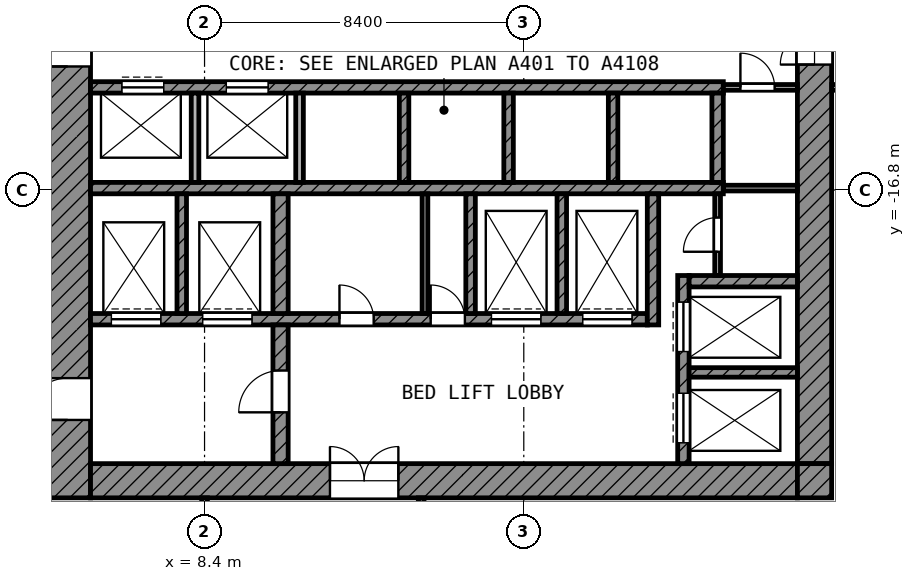
"""IFC4 building model, lengths in metres.
Left out: names, types, materials, properties, quantities, classifications, styles, units other than length and angle.
Written with IfcOpenShell. Run it as: python <this file> out.ifc"""

import sys

from ifc_helpers import new_model, si_unit, direction, frame, frame_2d, origin, place, context, subcontext, project, spatial, rectangle, extrude, element, fill, save


model = new_model("IFC4")
c1 = context("Model", 3, precision=1e-05, world=origin(), true_north=direction((0.0, 1.0)))
c2 = subcontext(c1, "Body", "Model", "MODEL_VIEW")
j1 = project(units=[si_unit("LENGTHUNIT", "METRE"), si_unit("PLANEANGLEUNIT", "RADIAN")], contexts=[c1])
p1 = place(None, origin())
s1 = spatial("IfcSite", under=j1, at=p1, CompositionType="ELEMENT")
p2 = place(p1, origin())
s2 = spatial("IfcBuilding", under=s1, at=p2, CompositionType="ELEMENT")
p3 = place(p2, frame((0.0, 0.0, 200.4)))
s3 = spatial("IfcBuildingStorey", under=s2, at=p3, CompositionType="ELEMENT", Elevation=200.4)
p4 = place(p3, frame((4.8, -24.9, 0.0), z_axis=(0.0, 0.0, 1.0), x_axis=(0.0, 1.0, 0.0)))
e1 = element("IfcWall", 1, at=p4, inside=s3, PredefinedType="SHEAR", context=c2, shape_type="SweptSolid", body=[
    extrude(rectangle(XDim=19.5, YDim=1.2, at=frame_2d((9.75, 0.0))), origin(), (0.0, 0.0, 1.0), 3.6),
])
p5 = place(p4, frame((11.35, 0.0, 0.0)))
e2 = element("IfcOpeningElement", 2, at=p5, cuts=e1, PredefinedType="OPENING", context=c2, shape_type="SweptSolid", body=[
    extrude(rectangle(XDim=1.1, YDim=2.1, at=frame_2d((0.55, 1.05))), frame((0.0, 0.61, 0.0), z_axis=(0.0, -1.0, 0.0), x_axis=(1.0, 0.0, 0.0)), (0.0, 0.0, 1.0), 1.22),
])
p6 = place(p4, frame((2.05, 0.0, 0.0)))
e3 = element("IfcOpeningElement", 3, at=p6, cuts=e1, PredefinedType="OPENING", context=c2, shape_type="SweptSolid", body=[
    extrude(rectangle(XDim=1.1, YDim=2.1, at=frame_2d((0.55, 1.05))), frame((0.0, 0.61, 0.0), z_axis=(0.0, -1.0, 0.0), x_axis=(1.0, 0.0, 0.0)), (0.0, 0.0, 1.0), 1.22),
])
p7 = place(p3, frame((24.45, -24.0, 0.0), z_axis=(0.0, 0.0, 1.0), x_axis=(0.0, 1.0, 0.0)))
e4 = element("IfcWall", 4, at=p7, inside=s3, PredefinedType="SHEAR", context=c2, shape_type="SweptSolid", body=[
    extrude(rectangle(XDim=18.6, YDim=0.9, at=frame_2d((9.3, 0.0))), origin(), (0.0, 0.0, 1.0), 3.6),
])
p8 = place(p7, frame((10.5, 0.0, 0.0)))
e5 = element("IfcOpeningElement", 5, at=p8, cuts=e4, PredefinedType="OPENING", context=c2, shape_type="SweptSolid", body=[
    extrude(rectangle(XDim=1.8, YDim=2.1, at=frame_2d((0.9, 1.05))), frame((0.0, 0.46, 0.0), z_axis=(0.0, -1.0, 0.0), x_axis=(1.0, 0.0, 0.0)), (0.0, 0.0, 1.0), 0.92),
])
p9 = place(p3, frame((5.4, -24.45, 0.0), z_axis=(0.0, 0.0, 1.0), x_axis=(1.0, 0.0, 0.0)))
e6 = element("IfcWall", 6, at=p9, inside=s3, PredefinedType="SHEAR", context=c2, shape_type="SweptSolid", body=[
    extrude(rectangle(XDim=18.6, YDim=0.9, at=frame_2d((9.3, 0.0))), origin(), (0.0, 0.0, 1.0), 3.6),
])
p10 = place(p9, frame((6.3, 0.0, 0.0)))
e7 = element("IfcOpeningElement", 7, at=p10, cuts=e6, PredefinedType="OPENING", context=c2, shape_type="SweptSolid", body=[
    extrude(rectangle(XDim=1.8, YDim=2.1, at=frame_2d((0.9, 1.05))), frame((0.0, 0.46, 0.0), z_axis=(0.0, -1.0, 0.0), x_axis=(1.0, 0.0, 0.0)), (0.0, 0.0, 1.0), 0.92),
])
p11 = place(p3, frame((24.45, -24.9, 0.0), z_axis=(0.0, 0.0, 1.0), x_axis=(0.0, 1.0, 0.0)))
e8 = element("IfcWall", 8, at=p11, inside=s3, PredefinedType="SHEAR", context=c2, shape_type="SweptSolid", body=[
    extrude(rectangle(XDim=0.9, YDim=0.9, at=frame_2d((0.45, 0.0))), origin(), (0.0, 0.0, 1.0), 3.6),
])
p12 = place(p3, frame((5.4, -14.1, 0.0), z_axis=(0.0, 0.0, 1.0), x_axis=(1.0, 0.0, 0.0)))
e9 = element("IfcWall", 9, at=p12, inside=s3, PredefinedType="SHEAR", context=c2, shape_type="SweptSolid", body=[
    extrude(rectangle(XDim=16.65, YDim=0.3, at=frame_2d((8.325, 0.0))), origin(), (0.0, 0.0, 1.0), 3.6),
])
p13 = place(p12, frame((0.825, 0.0, 0.0)))
e10 = element("IfcOpeningElement", 10, at=p13, cuts=e9, PredefinedType="OPENING", context=c2, shape_type="SweptSolid", body=[
    extrude(rectangle(XDim=1.1, YDim=2.1, at=frame_2d((0.55, 1.05))), frame((0.0, 0.16, 0.0), z_axis=(0.0, -1.0, 0.0), x_axis=(1.0, 0.0, 0.0)), (0.0, 0.0, 1.0), 0.32),
])
p14 = place(p12, frame((3.575, 0.0, 0.0)))
e11 = element("IfcOpeningElement", 11, at=p14, cuts=e9, PredefinedType="OPENING", context=c2, shape_type="SweptSolid", body=[
    extrude(rectangle(XDim=1.1, YDim=2.1, at=frame_2d((0.55, 1.05))), frame((0.0, 0.16, 0.0), z_axis=(0.0, -1.0, 0.0), x_axis=(1.0, 0.0, 0.0)), (0.0, 0.0, 1.0), 0.32),
])
p15 = place(p3, frame((5.4, -16.75, 0.0), z_axis=(0.0, 0.0, 1.0), x_axis=(1.0, 0.0, 0.0)))
e12 = element("IfcWall", 12, at=p15, inside=s3, PredefinedType="SHEAR", context=c2, shape_type="SweptSolid", body=[
    extrude(rectangle(XDim=16.65, YDim=0.3, at=frame_2d((8.325, 0.0))), origin(), (0.0, 0.0, 1.0), 3.6),
])
p16 = place(p3, frame((5.4, -20.2, 0.0), z_axis=(0.0, 0.0, 1.0), x_axis=(1.0, 0.0, 0.0)))
e13 = element("IfcWall", 13, at=p16, inside=s3, PredefinedType="SHEAR", context=c2, shape_type="SweptSolid", body=[
    extrude(rectangle(XDim=14.65, YDim=0.3, at=frame_2d((7.325, 0.0))), origin(), (0.0, 0.0, 1.0), 3.6),
])
p17 = place(p16, frame((10.55, 0.0, 0.0)))
e14 = element("IfcOpeningElement", 14, at=p17, cuts=e13, PredefinedType="OPENING", context=c2, shape_type="SweptSolid", body=[
    extrude(rectangle(XDim=1.3, YDim=2.1, at=frame_2d((0.65, 1.05))), frame((0.0, 0.16, 0.0), z_axis=(0.0, -1.0, 0.0), x_axis=(1.0, 0.0, 0.0)), (0.0, 0.0, 1.0), 0.32),
])
p18 = place(p16, frame((12.95, 0.0, 0.0)))
e15 = element("IfcOpeningElement", 15, at=p18, cuts=e13, PredefinedType="OPENING", context=c2, shape_type="SweptSolid", body=[
    extrude(rectangle(XDim=1.3, YDim=2.1, at=frame_2d((0.65, 1.05))), frame((0.0, 0.16, 0.0), z_axis=(0.0, -1.0, 0.0), x_axis=(1.0, 0.0, 0.0)), (0.0, 0.0, 1.0), 0.32),
])
p19 = place(p16, frame((0.55, 0.0, 0.0)))
e16 = element("IfcOpeningElement", 16, at=p19, cuts=e13, PredefinedType="OPENING", context=c2, shape_type="SweptSolid", body=[
    extrude(rectangle(XDim=1.3, YDim=2.1, at=frame_2d((0.65, 1.05))), frame((0.0, 0.16, 0.0), z_axis=(0.0, -1.0, 0.0), x_axis=(1.0, 0.0, 0.0)), (0.0, 0.0, 1.0), 0.32),
])
p20 = place(p16, frame((2.95, 0.0, 0.0)))
e17 = element("IfcOpeningElement", 17, at=p20, cuts=e13, PredefinedType="OPENING", context=c2, shape_type="SweptSolid", body=[
    extrude(rectangle(XDim=1.3, YDim=2.1, at=frame_2d((0.65, 1.05))), frame((0.0, 0.16, 0.0), z_axis=(0.0, -1.0, 0.0), x_axis=(1.0, 0.0, 0.0)), (0.0, 0.0, 1.0), 0.32),
])
p21 = place(p16, frame((6.55, 0.0, 0.0)))
e18 = element("IfcOpeningElement", 18, at=p21, cuts=e13, PredefinedType="OPENING", context=c2, shape_type="SweptSolid", body=[
    extrude(rectangle(XDim=0.9, YDim=2.1, at=frame_2d((0.45, 1.05))), frame((0.0, 0.16, 0.0), z_axis=(0.0, -1.0, 0.0), x_axis=(1.0, 0.0, 0.0)), (0.0, 0.0, 1.0), 0.32),
])
p22 = place(p16, frame((8.95, 0.0, 0.0)))
e19 = element("IfcOpeningElement", 19, at=p22, cuts=e13, PredefinedType="OPENING", context=c2, shape_type="SweptSolid", body=[
    extrude(rectangle(XDim=0.9, YDim=2.1, at=frame_2d((0.45, 1.05))), frame((0.0, 0.16, 0.0), z_axis=(0.0, -1.0, 0.0), x_axis=(1.0, 0.0, 0.0)), (0.0, 0.0, 1.0), 0.32),
])
p23 = place(p3, frame((10.4, -24.0, 0.0), z_axis=(0.0, 0.0, 1.0), x_axis=(0.0, 1.0, 0.0)))
e20 = element("IfcWall", 20, at=p23, inside=s3, PredefinedType="SHEAR", context=c2, shape_type="SweptSolid", body=[
    extrude(rectangle(XDim=3.65, YDim=0.4, at=frame_2d((1.825, 0.0))), origin(), (0.0, 0.0, 1.0), 3.6),
])
p24 = place(p23, frame((1.35, 0.0, 0.0)))
e21 = element("IfcOpeningElement", 21, at=p24, cuts=e20, PredefinedType="OPENING", context=c2, shape_type="SweptSolid", body=[
    extrude(rectangle(XDim=1.1, YDim=2.1, at=frame_2d((0.55, 1.05))), frame((0.0, 0.21, 0.0), z_axis=(0.0, -1.0, 0.0), x_axis=(1.0, 0.0, 0.0)), (0.0, 0.0, 1.0), 0.42),
])
p25 = place(p3, frame((10.4, -20.05, 0.0), z_axis=(0.0, 0.0, 1.0), x_axis=(0.0, 1.0, 0.0)))
e22 = element("IfcWall", 22, at=p25, inside=s3, PredefinedType="SHEAR", context=c2, shape_type="SweptSolid", body=[
    extrude(rectangle(XDim=3.15, YDim=0.4, at=frame_2d((1.575, 0.0))), origin(), (0.0, 0.0, 1.0), 3.6),
])
p26 = place(p3, frame((20.2, -20.35, 0.0), z_axis=(0.0, 0.0, 1.0), x_axis=(0.0, 1.0, 0.0)))
e23 = element("IfcWall", 23, at=p26, inside=s3, PredefinedType="SHEAR", context=c2, shape_type="SweptSolid", body=[
    extrude(rectangle(XDim=3.45, YDim=0.3, at=frame_2d((1.725, 0.0))), origin(), (0.0, 0.0, 1.0), 3.6),
])
p27 = place(p3, frame((21.9, -16.6, 0.0), z_axis=(0.0, 0.0, 1.0), x_axis=(0.0, 1.0, 0.0)))
e24 = element("IfcWall", 24, at=p27, inside=s3, PredefinedType="SHEAR", context=c2, shape_type="SweptSolid", body=[
    extrude(rectangle(XDim=2.35, YDim=0.3, at=frame_2d((1.175, 0.0))), origin(), (0.0, 0.0, 1.0), 3.6),
])
p28 = place(p3, frame((21.15, -19.2, 0.0), z_axis=(0.0, 0.0, 1.0), x_axis=(1.0, 0.0, 0.0)))
e25 = element("IfcWall", 25, at=p28, inside=s3, PredefinedType="SHEAR", context=c2, shape_type="SweptSolid", body=[
    extrude(rectangle(XDim=2.85, YDim=0.3, at=frame_2d((1.425, 0.0))), origin(), (0.0, 0.0, 1.0), 3.6),
])
p29 = place(p3, frame((21.0, -24.0, 0.0), z_axis=(0.0, 0.0, 1.0), x_axis=(0.0, 1.0, 0.0)))
e26 = element("IfcWall", 26, at=p29, inside=s3, PredefinedType="SHEAR", context=c2, shape_type="SweptSolid", body=[
    extrude(rectangle(XDim=4.95, YDim=0.3, at=frame_2d((2.475, 0.0))), origin(), (0.0, 0.0, 1.0), 3.6),
])
p30 = place(p29, frame((2.95, 0.0, 0.0)))
e27 = element("IfcOpeningElement", 27, at=p30, cuts=e26, PredefinedType="OPENING", context=c2, shape_type="SweptSolid", body=[
    extrude(rectangle(XDim=1.3, YDim=2.1, at=frame_2d((0.65, 1.05))), frame((0.0, 0.16, 0.0), z_axis=(0.0, -1.0, 0.0), x_axis=(1.0, 0.0, 0.0)), (0.0, 0.0, 1.0), 0.32),
])
p31 = place(p29, frame((0.55, 0.0, 0.0)))
e28 = element("IfcOpeningElement", 28, at=p31, cuts=e26, PredefinedType="OPENING", context=c2, shape_type="SweptSolid", body=[
    extrude(rectangle(XDim=1.3, YDim=2.1, at=frame_2d((0.65, 1.05))), frame((0.0, 0.16, 0.0), z_axis=(0.0, -1.0, 0.0), x_axis=(1.0, 0.0, 0.0)), (0.0, 0.0, 1.0), 0.32),
])
p32 = place(p3, frame((21.15, -21.6, 0.0), z_axis=(0.0, 0.0, 1.0), x_axis=(1.0, 0.0, 0.0)))
e29 = element("IfcWall", 29, at=p32, inside=s3, PredefinedType="SHEAR", context=c2, shape_type="SweptSolid", body=[
    extrude(rectangle(XDim=2.85, YDim=0.25, at=frame_2d((1.425, 0.0))), origin(), (0.0, 0.0, 1.0), 3.6),
])
for number, where, z_axis, x_axis in (
    (30, (7.8, -20.05, 0.0), (0.0, 0.0, 1.0), (0.0, 1.0, 0.0)),
    (31, (15.4, -20.05, 0.0), (0.0, 0.0, 1.0), (0.0, 1.0, 0.0)),
    (32, (17.8, -20.05, 0.0), (0.0, 0.0, 1.0), (0.0, 1.0, 0.0)),
):
    element("IfcWall", number, at=place(p3, frame(where, z_axis=z_axis, x_axis=x_axis)), inside=s3, PredefinedType="SHEAR", context=c2, shape_type="SweptSolid", body=[
        extrude(rectangle(XDim=3.15, YDim=0.25, at=frame_2d((1.575, 0.0))), origin(), (0.0, 0.0, 1.0), 3.6),
    ])
for number, where, z_axis, x_axis in (
    (33, (8.15, -16.6, 0.0), (0.0, 0.0, 1.0), (0.0, 1.0, 0.0)),
    (34, (10.9, -16.6, 0.0), (0.0, 0.0, 1.0), (0.0, 1.0, 0.0)),
):
    element("IfcWall", number, at=place(p3, frame(where, z_axis=z_axis, x_axis=x_axis)), inside=s3, PredefinedType="PARTITIONING", context=c2, shape_type="SweptSolid", body=[
        extrude(rectangle(XDim=2.35, YDim=0.2, at=frame_2d((1.175, 0.0))), origin(), (0.0, 0.0, 1.0), 3.6),
    ])
for number, where, z_axis, x_axis in (
    (35, (13.65, -16.6, 0.0), (0.0, 0.0, 1.0), (0.0, 1.0, 0.0)),
    (36, (16.4, -16.6, 0.0), (0.0, 0.0, 1.0), (0.0, 1.0, 0.0)),
    (37, (19.15, -16.6, 0.0), (0.0, 0.0, 1.0), (0.0, 1.0, 0.0)),
):
    element("IfcWall", number, at=place(p3, frame(where, z_axis=z_axis, x_axis=x_axis)), inside=s3, PredefinedType="SHEAR", context=c2, shape_type="SweptSolid", body=[
        extrude(rectangle(XDim=2.35, YDim=0.25, at=frame_2d((1.175, 0.0))), origin(), (0.0, 0.0, 1.0), 3.6),
    ])
p33 = place(p3, frame((21.9, -19.05, 0.0), z_axis=(0.0, 0.0, 1.0), x_axis=(0.0, 1.0, 0.0)))
e38 = element("IfcWall", 38, at=p33, inside=s3, PredefinedType="PARTITIONING", context=c2, shape_type="SweptSolid", body=[
    extrude(rectangle(XDim=2.15, YDim=0.15, at=frame_2d((1.075, 0.0))), origin(), (0.0, 0.0, 1.0), 3.6),
])
p34 = place(p33, frame((0.625, 0.0, 0.0)))
e39 = element("IfcOpeningElement", 39, at=p34, cuts=e38, PredefinedType="OPENING", context=c2, shape_type="SweptSolid", body=[
    extrude(rectangle(XDim=0.9, YDim=2.1, at=frame_2d((0.45, 1.05))), frame((0.0, 0.085, 0.0), z_axis=(0.0, -1.0, 0.0), x_axis=(1.0, 0.0, 0.0)), (0.0, 0.0, 1.0), 0.17),
])
p35 = place(p3, frame((22.05, -16.75, 0.0), z_axis=(0.0, 0.0, 1.0), x_axis=(1.0, 0.0, 0.0)))
e40 = element("IfcWall", 40, at=p35, inside=s3, PredefinedType="PARTITIONING", context=c2, shape_type="SweptSolid", body=[
    extrude(rectangle(XDim=1.95, YDim=0.15, at=frame_2d((0.975, 0.0))), origin(), (0.0, 0.0, 1.0), 3.6),
])
p36 = place(p3, frame((22.05, -14.1, 0.0), z_axis=(0.0, 0.0, 1.0), x_axis=(1.0, 0.0, 0.0)))
e41 = element("IfcWall", 41, at=p36, inside=s3, PredefinedType="PARTITIONING", context=c2, shape_type="SweptSolid", body=[
    extrude(rectangle(XDim=1.95, YDim=0.15, at=frame_2d((0.975, 0.0))), origin(), (0.0, 0.0, 1.0), 3.6),
])
p37 = place(p36, frame((0.45, 0.0, 0.0)))
e42 = element("IfcOpeningElement", 42, at=p37, cuts=e41, PredefinedType="OPENING", context=c2, shape_type="SweptSolid", body=[
    extrude(rectangle(XDim=0.9, YDim=2.1, at=frame_2d((0.45, 1.05))), frame((0.0, 0.085, 0.0), z_axis=(0.0, -1.0, 0.0), x_axis=(1.0, 0.0, 0.0)), (0.0, 0.0, 1.0), 0.17),
])
p38 = place(p3, frame((14.2, -20.05, 0.0), z_axis=(0.0, 0.0, 1.0), x_axis=(0.0, 1.0, 0.0)))
e43 = element("IfcWall", 43, at=p38, inside=s3, PredefinedType="PARTITIONING", context=c2, shape_type="SweptSolid", body=[
    extrude(rectangle(XDim=3.15, YDim=0.15, at=frame_2d((1.575, 0.0))), origin(), (0.0, 0.0, 1.0), 3.6),
])
p39 = place(p3, frame((24.9, -14.1, 0.0), z_axis=(0.0, 0.0, 1.0), x_axis=(1.0, 0.0, 0.0)))
e44 = element("IfcWall", 44, at=p39, inside=s3, PredefinedType="PARTITIONING", context=c2, shape_type="SweptSolid", body=[
    extrude(rectangle(XDim=4.425, YDim=0.15, at=frame_2d((2.212, 0.0))), origin(), (0.0, 0.0, 1.0), 3.6),
])
p40 = place(p39, frame((1.65, 0.0, 0.0)))
e45 = element("IfcOpeningElement", 45, at=p40, cuts=e44, PredefinedType="OPENING", context=c2, shape_type="SweptSolid", body=[
    extrude(rectangle(XDim=1.5, YDim=2.1, at=frame_2d((0.75, 1.05))), frame((0.0, 0.085, 0.0), z_axis=(0.0, -1.0, 0.0), x_axis=(1.0, 0.0, 0.0)), (0.0, 0.0, 1.0), 0.17),
])
p41 = place(p3, frame((8.4, -31.857, 0.0), z_axis=(0.0, 0.0, 1.0), x_axis=(0.0, 1.0, 0.0)))
e46 = element("IfcWall", 46, at=p41, inside=s3, PredefinedType="PARTITIONING", context=c2, shape_type="SweptSolid", body=[
    extrude(rectangle(XDim=6.957, YDim=0.15, at=frame_2d((3.479, 0.0))), origin(), (0.0, 0.0, 1.0), 3.6),
])
p42 = place(p3, frame((14.1, -29.325, 0.0), z_axis=(0.0, 0.0, 1.0), x_axis=(0.0, 1.0, 0.0)))
e47 = element("IfcWall", 47, at=p42, inside=s3, PredefinedType="PARTITIONING", context=c2, shape_type="SweptSolid", body=[
    extrude(rectangle(XDim=4.425, YDim=0.15, at=frame_2d((2.212, 0.0))), origin(), (0.0, 0.0, 1.0), 3.6),
])
p43 = place(p13, origin())
e48 = element("IfcDoor", 48, at=p43, inside=s3, OperationType="DOUBLE_DOOR_SLIDING", PredefinedType="DOOR", context=c2, shape_type="SweptSolid", body=[
    extrude(rectangle(XDim=1.1, YDim=2.1, at=frame_2d((0.55, 1.05))), frame((0.0, 0.025, 0.0), z_axis=(0.0, -1.0, 0.0), x_axis=(1.0, 0.0, 0.0)), (0.0, 0.0, 1.0), 0.05),
])
fill(e10, e48)
p44 = place(p14, origin())
e49 = element("IfcDoor", 49, at=p44, inside=s3, OperationType="DOUBLE_DOOR_SLIDING", PredefinedType="DOOR", context=c2, shape_type="SweptSolid", body=[
    extrude(rectangle(XDim=1.1, YDim=2.1, at=frame_2d((0.55, 1.05))), frame((0.0, 0.025, 0.0), z_axis=(0.0, -1.0, 0.0), x_axis=(1.0, 0.0, 0.0)), (0.0, 0.0, 1.0), 0.05),
])
fill(e11, e49)
p45 = place(p30, origin())
e50 = element("IfcDoor", 50, at=p45, inside=s3, OperationType="DOUBLE_DOOR_SLIDING", PredefinedType="DOOR", context=c2, shape_type="SweptSolid", body=[
    extrude(rectangle(XDim=1.3, YDim=2.1, at=frame_2d((0.65, 1.05))), frame((0.0, 0.025, 0.0), z_axis=(0.0, -1.0, 0.0), x_axis=(1.0, 0.0, 0.0)), (0.0, 0.0, 1.0), 0.05),
])
fill(e27, e50)
p46 = place(p31, origin())
e51 = element("IfcDoor", 51, at=p46, inside=s3, OperationType="DOUBLE_DOOR_SLIDING", PredefinedType="DOOR", context=c2, shape_type="SweptSolid", body=[
    extrude(rectangle(XDim=1.3, YDim=2.1, at=frame_2d((0.65, 1.05))), frame((0.0, 0.025, 0.0), z_axis=(0.0, -1.0, 0.0), x_axis=(1.0, 0.0, 0.0)), (0.0, 0.0, 1.0), 0.05),
])
fill(e28, e51)
p47 = place(p17, origin())
e52 = element("IfcDoor", 52, at=p47, inside=s3, OperationType="DOUBLE_DOOR_SLIDING", PredefinedType="DOOR", context=c2, shape_type="SweptSolid", body=[
    extrude(rectangle(XDim=1.3, YDim=2.1, at=frame_2d((0.65, 1.05))), frame((0.0, 0.025, 0.0), z_axis=(0.0, -1.0, 0.0), x_axis=(1.0, 0.0, 0.0)), (0.0, 0.0, 1.0), 0.05),
])
fill(e14, e52)
p48 = place(p18, origin())
e53 = element("IfcDoor", 53, at=p48, inside=s3, OperationType="DOUBLE_DOOR_SLIDING", PredefinedType="DOOR", context=c2, shape_type="SweptSolid", body=[
    extrude(rectangle(XDim=1.3, YDim=2.1, at=frame_2d((0.65, 1.05))), frame((0.0, 0.025, 0.0), z_axis=(0.0, -1.0, 0.0), x_axis=(1.0, 0.0, 0.0)), (0.0, 0.0, 1.0), 0.05),
])
fill(e15, e53)
p49 = place(p19, origin())
e54 = element("IfcDoor", 54, at=p49, inside=s3, OperationType="DOUBLE_DOOR_SLIDING", PredefinedType="DOOR", context=c2, shape_type="SweptSolid", body=[
    extrude(rectangle(XDim=1.3, YDim=2.1, at=frame_2d((0.65, 1.05))), frame((0.0, 0.025, 0.0), z_axis=(0.0, -1.0, 0.0), x_axis=(1.0, 0.0, 0.0)), (0.0, 0.0, 1.0), 0.05),
])
fill(e16, e54)
p50 = place(p20, origin())
e55 = element("IfcDoor", 55, at=p50, inside=s3, OperationType="DOUBLE_DOOR_SLIDING", PredefinedType="DOOR", context=c2, shape_type="SweptSolid", body=[
    extrude(rectangle(XDim=1.3, YDim=2.1, at=frame_2d((0.65, 1.05))), frame((0.0, 0.025, 0.0), z_axis=(0.0, -1.0, 0.0), x_axis=(1.0, 0.0, 0.0)), (0.0, 0.0, 1.0), 0.05),
])
fill(e17, e55)
p51 = place(p5, origin())
e56 = element("IfcDoor", 56, at=p51, inside=s3, OperationType="SINGLE_SWING_LEFT", PredefinedType="DOOR", context=c2, shape_type="SweptSolid", body=[
    extrude(rectangle(XDim=1.1, YDim=2.1, at=frame_2d((0.55, 1.05))), frame((0.0, 0.025, 0.0), z_axis=(0.0, -1.0, 0.0), x_axis=(1.0, 0.0, 0.0)), (0.0, 0.0, 1.0), 0.05),
])
fill(e2, e56)
p52 = place(p6, origin())
e57 = element("IfcDoor", 57, at=p52, inside=s3, OperationType="SINGLE_SWING_LEFT", PredefinedType="DOOR", context=c2, shape_type="SweptSolid", body=[
    extrude(rectangle(XDim=1.1, YDim=2.1, at=frame_2d((0.55, 1.05))), frame((0.0, 0.025, 0.0), z_axis=(0.0, -1.0, 0.0), x_axis=(1.0, 0.0, 0.0)), (0.0, 0.0, 1.0), 0.05),
])
fill(e3, e57)
p53 = place(p24, origin())
e58 = element("IfcDoor", 58, at=p53, inside=s3, OperationType="SINGLE_SWING_LEFT", PredefinedType="DOOR", context=c2, shape_type="SweptSolid", body=[
    extrude(rectangle(XDim=1.1, YDim=2.1, at=frame_2d((0.55, 1.05))), frame((0.0, 0.025, 0.0), z_axis=(0.0, -1.0, 0.0), x_axis=(1.0, 0.0, 0.0)), (0.0, 0.0, 1.0), 0.05),
])
fill(e21, e58)
p54 = place(p8, origin())
e59 = element("IfcDoor", 59, at=p54, inside=s3, OperationType="DOUBLE_DOOR_SINGLE_SWING", PredefinedType="DOOR", context=c2, shape_type="SweptSolid", body=[
    extrude(rectangle(XDim=1.8, YDim=2.1, at=frame_2d((0.9, 1.05))), frame((0.0, 0.025, 0.0), z_axis=(0.0, -1.0, 0.0), x_axis=(1.0, 0.0, 0.0)), (0.0, 0.0, 1.0), 0.05),
])
fill(e5, e59)
p55 = place(p10, origin())
e60 = element("IfcDoor", 60, at=p55, inside=s3, OperationType="DOUBLE_DOOR_SINGLE_SWING", PredefinedType="DOOR", context=c2, shape_type="SweptSolid", body=[
    extrude(rectangle(XDim=1.8, YDim=2.1, at=frame_2d((0.9, 1.05))), frame((0.0, 0.025, 0.0), z_axis=(0.0, -1.0, 0.0), x_axis=(1.0, 0.0, 0.0)), (0.0, 0.0, 1.0), 0.05),
])
fill(e7, e60)
p56 = place(p37, origin())
e61 = element("IfcDoor", 61, at=p56, inside=s3, OperationType="SINGLE_SWING_LEFT", PredefinedType="DOOR", context=c2, shape_type="SweptSolid", body=[
    extrude(rectangle(XDim=0.9, YDim=2.1, at=frame_2d((0.45, 1.05))), frame((0.0, 0.025, 0.0), z_axis=(0.0, -1.0, 0.0), x_axis=(1.0, 0.0, 0.0)), (0.0, 0.0, 1.0), 0.05),
])
fill(e42, e61)
p57 = place(p34, origin())
e62 = element("IfcDoor", 62, at=p57, inside=s3, OperationType="SINGLE_SWING_LEFT", PredefinedType="DOOR", context=c2, shape_type="SweptSolid", body=[
    extrude(rectangle(XDim=0.9, YDim=2.1, at=frame_2d((0.45, 1.05))), frame((0.0, 0.025, 0.0), z_axis=(0.0, -1.0, 0.0), x_axis=(1.0, 0.0, 0.0)), (0.0, 0.0, 1.0), 0.05),
])
fill(e39, e62)
p58 = place(p21, origin())
e63 = element("IfcDoor", 63, at=p58, inside=s3, OperationType="SINGLE_SWING_LEFT", PredefinedType="DOOR", context=c2, shape_type="SweptSolid", body=[
    extrude(rectangle(XDim=0.9, YDim=2.1, at=frame_2d((0.45, 1.05))), frame((0.0, 0.025, 0.0), z_axis=(0.0, -1.0, 0.0), x_axis=(1.0, 0.0, 0.0)), (0.0, 0.0, 1.0), 0.05),
])
fill(e18, e63)
p59 = place(p22, origin())
e64 = element("IfcDoor", 64, at=p59, inside=s3, OperationType="SINGLE_SWING_LEFT", PredefinedType="DOOR", context=c2, shape_type="SweptSolid", body=[
    extrude(rectangle(XDim=0.9, YDim=2.1, at=frame_2d((0.45, 1.05))), frame((0.0, 0.025, 0.0), z_axis=(0.0, -1.0, 0.0), x_axis=(1.0, 0.0, 0.0)), (0.0, 0.0, 1.0), 0.05),
])
fill(e19, e64)
save(model, sys.argv[1])
